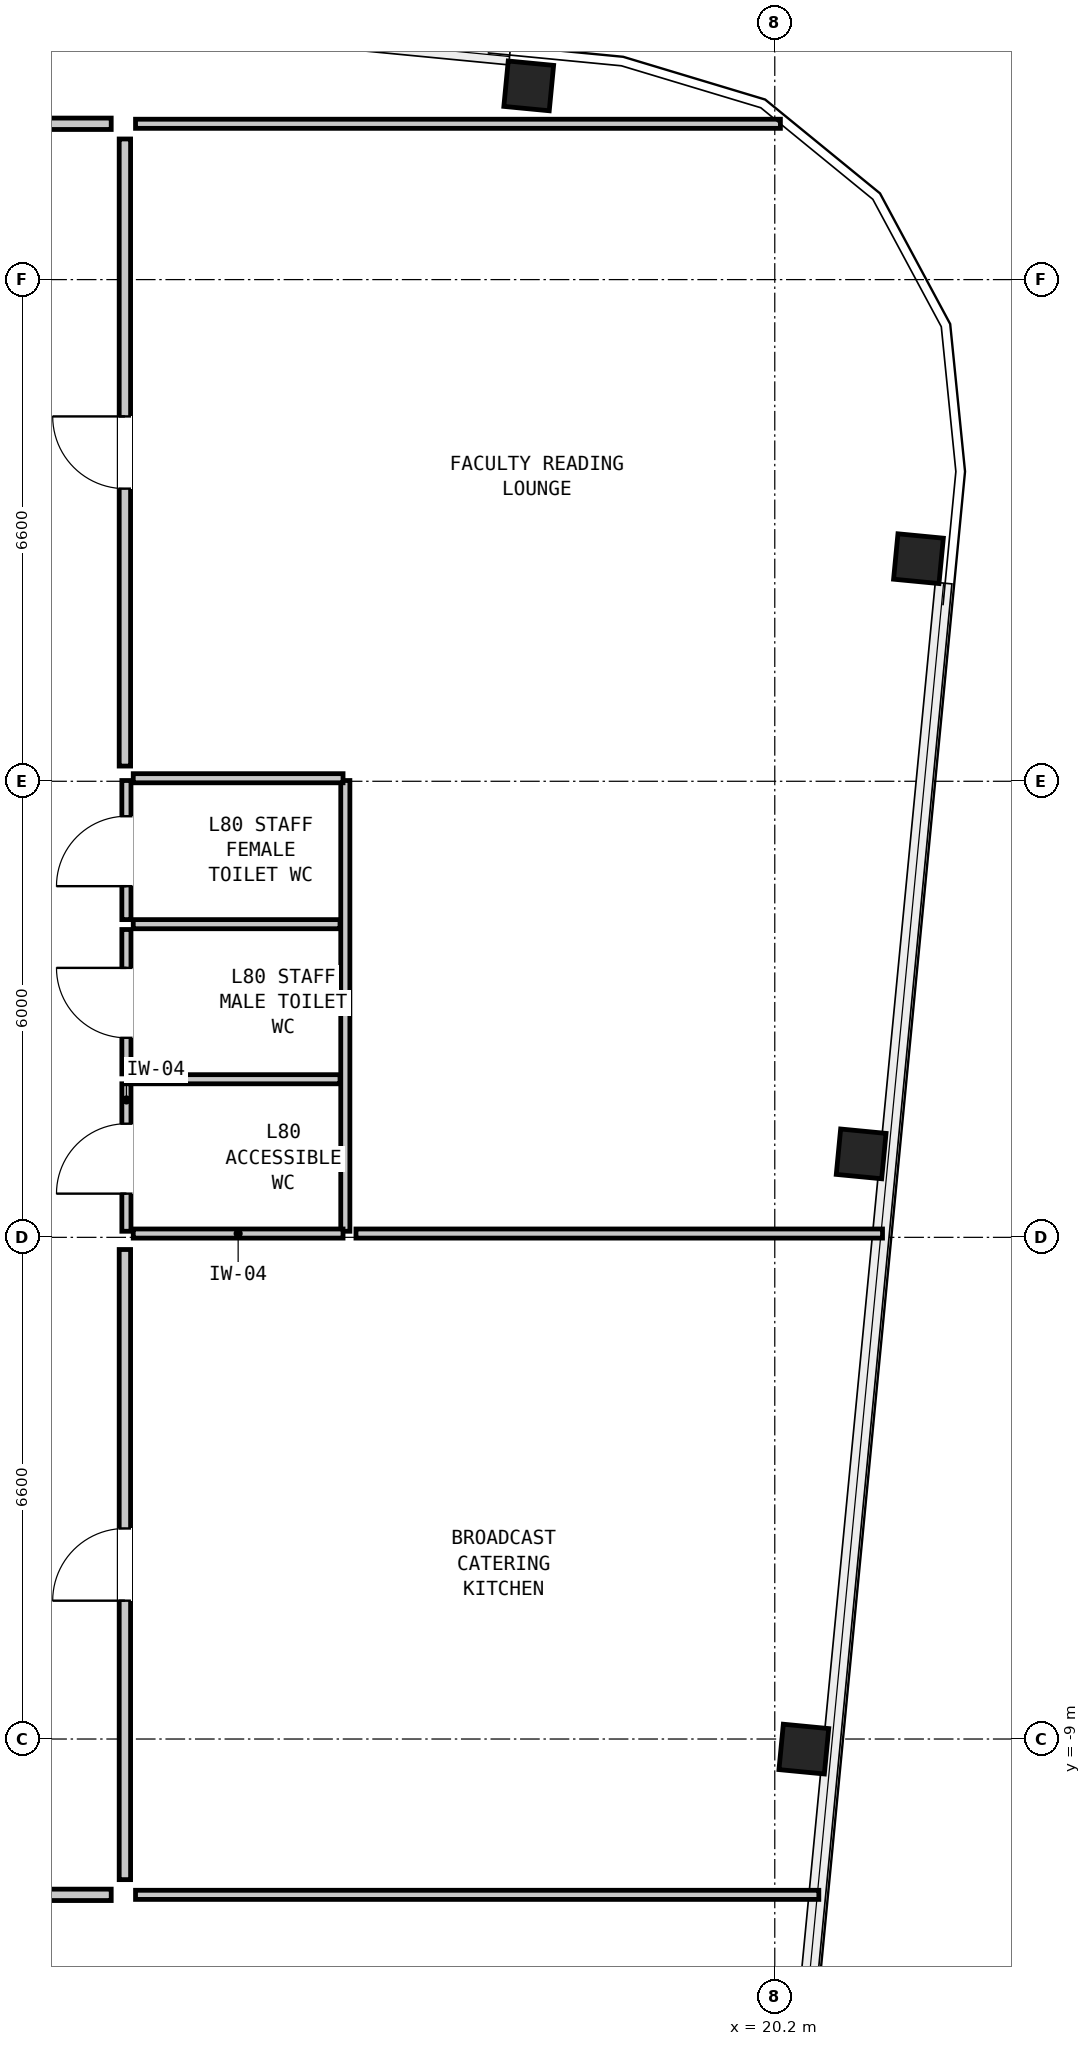
"""IFC4 building model, lengths in metres.
Left out: names, types, materials, properties, quantities, classifications, styles, units other than length and angle.
Written with IfcOpenShell. Run it as: python <this file> out.ifc"""

import sys

from ifc_helpers import new_model, si_unit, direction, frame, frame_2d, origin, origin_2d, place, context, subcontext, project, spatial, rectangle, hollow_rectangle, extrude, element, fill, save


model = new_model("IFC4")
c1 = context("Model", 3, precision=1e-05, world=origin(), true_north=direction((0.0, 1.0)))
c2 = subcontext(c1, "Body", "Model", "MODEL_VIEW")
j1 = project(units=[si_unit("LENGTHUNIT", "METRE"), si_unit("PLANEANGLEUNIT", "RADIAN")], contexts=[c1])
p1 = place(None, origin())
s1 = spatial("IfcSite", under=j1, at=p1, CompositionType="ELEMENT")
p2 = place(p1, origin())
s2 = spatial("IfcBuilding", under=s1, at=p2, CompositionType="ELEMENT")
p3 = place(p2, frame((0.0, 0.0, 270.3)))
s3 = spatial("IfcBuildingStorey", under=s2, at=p3, CompositionType="ELEMENT", Elevation=270.3)
for number, where, z_axis, x_axis in (
    (1, (20.583, -9.133, 0.0), (0.0, 0.0, 1.0), (0.096, 0.995, 0.0)),
    (2, (21.336, -1.302, 0.0), (0.0, 0.0, 1.0), (0.096, 0.995, 0.0)),
    (3, (22.09, 6.528, 0.0), (0.0, 0.0, 1.0), (0.096, 0.995, 0.0)),
    (4, (16.963, 12.749, 0.0), (0.0, 0.0, 1.0), (0.995, -0.096, 0.0)),
):
    element("IfcColumn", number, at=place(p3, frame(where, z_axis=z_axis, x_axis=x_axis)), inside=s3, PredefinedType="COLUMN", context=c2, shape_type="SweptSolid", body=[
        extrude(hollow_rectangle(XDim=0.6, YDim=0.6, WallThickness=0.04, at=origin_2d()), origin(), (0.0, 0.0, 1.0), 3.05),
    ])
p4 = place(p3, frame((11.67, -2.32, 0.0), z_axis=(0.0, 0.0, 1.0), x_axis=(0.0, 1.0, 0.0)))
e5 = element("IfcWall", 5, at=p4, inside=s3, PredefinedType="PARTITIONING", context=c2, shape_type="SweptSolid", body=[
    extrude(rectangle(XDim=1.94, YDim=0.12, at=frame_2d((0.97, 0.0))), origin(), (0.0, 0.0, 1.0), 2.86),
])
p5 = place(p4, frame((0.495, 0.0, 0.0)))
e6 = element("IfcOpeningElement", 6, at=p5, cuts=e5, PredefinedType="OPENING", context=c2, shape_type="SweptSolid", body=[
    extrude(rectangle(XDim=0.92, YDim=2.1, at=frame_2d((0.46, 1.05))), frame((0.0, 0.072, 0.0), z_axis=(0.0, -1.0, 0.0), x_axis=(1.0, 0.0, 0.0)), (0.0, 0.0, 1.0), 0.144),
])
p6 = place(p3, frame((11.67, -0.25, 0.0), z_axis=(0.0, 0.0, 1.0), x_axis=(0.0, 1.0, 0.0)))
e7 = element("IfcWall", 7, at=p6, inside=s3, PredefinedType="PARTITIONING", context=c2, shape_type="SweptSolid", body=[
    extrude(rectangle(XDim=1.9, YDim=0.12, at=frame_2d((0.95, 0.0))), origin(), (0.0, 0.0, 1.0), 2.86),
])
p7 = place(p6, frame((0.475, 0.0, 0.0)))
e8 = element("IfcOpeningElement", 8, at=p7, cuts=e7, PredefinedType="OPENING", context=c2, shape_type="SweptSolid", body=[
    extrude(rectangle(XDim=0.92, YDim=2.1, at=frame_2d((0.46, 1.05))), frame((0.0, 0.072, 0.0), z_axis=(0.0, -1.0, 0.0), x_axis=(1.0, 0.0, 0.0)), (0.0, 0.0, 1.0), 0.144),
])
p8 = place(p3, frame((11.67, 1.78, 0.0), z_axis=(0.0, 0.0, 1.0), x_axis=(0.0, 1.0, 0.0)))
e9 = element("IfcWall", 9, at=p8, inside=s3, PredefinedType="PARTITIONING", context=c2, shape_type="SweptSolid", body=[
    extrude(rectangle(XDim=1.83, YDim=0.12, at=frame_2d((0.915, 0.0))), origin(), (0.0, 0.0, 1.0), 2.86),
])
p9 = place(p8, frame((0.44, 0.0, 0.0)))
e10 = element("IfcOpeningElement", 10, at=p9, cuts=e9, PredefinedType="OPENING", context=c2, shape_type="SweptSolid", body=[
    extrude(rectangle(XDim=0.92, YDim=2.1, at=frame_2d((0.46, 1.05))), frame((0.0, 0.072, 0.0), z_axis=(0.0, -1.0, 0.0), x_axis=(1.0, 0.0, 0.0)), (0.0, 0.0, 1.0), 0.144),
])
p10 = place(p3, frame((14.55, -2.32, 0.0), z_axis=(0.0, 0.0, 1.0), x_axis=(0.0, 1.0, 0.0)))
e11 = element("IfcWall", 11, at=p10, inside=s3, PredefinedType="PARTITIONING", context=c2, shape_type="SweptSolid", body=[
    extrude(rectangle(XDim=5.93, YDim=0.12, at=frame_2d((2.965, 0.0))), origin(), (0.0, 0.0, 1.0), 2.86),
])
for number, where, z_axis, x_axis in (
    (12, (11.76, -2.35, 0.0), (0.0, 0.0, 1.0), (1.0, 0.0, 0.0)),
    (13, (11.76, 3.64, 0.0), (0.0, 0.0, 1.0), (1.0, 0.0, 0.0)),
):
    element("IfcWall", number, at=place(p3, frame(where, z_axis=z_axis, x_axis=x_axis)), inside=s3, PredefinedType="PARTITIONING", context=c2, shape_type="SweptSolid", body=[
        extrude(rectangle(XDim=2.76, YDim=0.12, at=frame_2d((1.38, 0.0))), origin(), (0.0, 0.0, 1.0), 1.24),
    ])
for number, where, z_axis, x_axis in (
    (14, (11.76, -0.32, 0.0), (0.0, 0.0, 1.0), (1.0, 0.0, 0.0)),
    (15, (11.76, 1.72, 0.0), (0.0, 0.0, 1.0), (1.0, 0.0, 0.0)),
):
    element("IfcWall", number, at=place(p3, frame(where, z_axis=z_axis, x_axis=x_axis)), inside=s3, PredefinedType="PARTITIONING", context=c2, shape_type="SweptSolid", body=[
        extrude(rectangle(XDim=2.72, YDim=0.12, at=frame_2d((1.36, 0.0))), origin(), (0.0, 0.0, 1.0), 2.86),
    ])
p11 = place(p3, frame((11.79, 12.25, 0.0), z_axis=(0.0, 0.0, 1.0), x_axis=(1.0, 0.0, 0.0)))
e16 = element("IfcWall", 16, at=p11, inside=s3, PredefinedType="PARTITIONING", context=c2, shape_type="SweptSolid", body=[
    extrude(rectangle(XDim=8.484, YDim=0.12, at=frame_2d((4.242, 0.0))), origin(), (0.0, 0.0, 1.0), 2.86),
])
p12 = place(p3, frame((11.79, -11.05, 0.0), z_axis=(0.0, 0.0, 1.0), x_axis=(1.0, 0.0, 0.0)))
e17 = element("IfcWall", 17, at=p12, inside=s3, PredefinedType="PARTITIONING", context=c2, shape_type="SweptSolid", body=[
    extrude(rectangle(XDim=8.99, YDim=0.12, at=frame_2d((4.495, 0.0))), origin(), (0.0, 0.0, 1.0), 2.86),
])
p13 = place(p3, frame((14.69, -2.35, 0.0), z_axis=(0.0, 0.0, 1.0), x_axis=(1.0, 0.0, 0.0)))
e18 = element("IfcWall", 18, at=p13, inside=s3, PredefinedType="PARTITIONING", context=c2, shape_type="SweptSolid", body=[
    extrude(rectangle(XDim=6.927, YDim=0.12, at=frame_2d((3.464, 0.0))), origin(), (0.0, 0.0, 1.0), 1.24),
])
p14 = place(p3, frame((5.58, 12.25, 0.0), z_axis=(0.0, 0.0, 1.0), x_axis=(1.0, 0.0, 0.0)))
e19 = element("IfcWall", 19, at=p14, inside=s3, PredefinedType="PARTITIONING", context=c2, shape_type="SweptSolid", body=[
    extrude(rectangle(XDim=5.89, YDim=0.15, at=frame_2d((2.945, 0.0))), origin(), (0.0, 0.0, 1.0), 2.86),
])
p15 = place(p14, frame((1.045, 0.0, 0.0)))
e20 = element("IfcOpeningElement", 20, at=p15, cuts=e19, PredefinedType="OPENING", context=c2, shape_type="SweptSolid", body=[
    extrude(rectangle(XDim=1.2, YDim=2.1, at=frame_2d((0.6, 1.05))), frame((0.0, 0.087, 0.0), z_axis=(0.0, -1.0, 0.0), x_axis=(1.0, 0.0, 0.0)), (0.0, 0.0, 1.0), 0.174),
])
p16 = place(p3, frame((0.18, -11.05, 0.0), z_axis=(0.0, 0.0, 1.0), x_axis=(1.0, 0.0, 0.0)))
e21 = element("IfcWall", 21, at=p16, inside=s3, PredefinedType="PARTITIONING", context=c2, shape_type="SweptSolid", body=[
    extrude(rectangle(XDim=11.29, YDim=0.15, at=frame_2d((5.645, 0.0))), origin(), (0.0, 0.0, 1.0), 2.86),
])
p17 = place(p16, frame((5.045, 0.0, 0.0)))
e22 = element("IfcOpeningElement", 22, at=p17, cuts=e21, PredefinedType="OPENING", context=c2, shape_type="SweptSolid", body=[
    extrude(rectangle(XDim=1.2, YDim=2.1, at=frame_2d((0.6, 1.05))), frame((0.0, 0.087, 0.0), z_axis=(0.0, -1.0, 0.0), x_axis=(1.0, 0.0, 0.0)), (0.0, 0.0, 1.0), 0.174),
])
p18 = place(p3, frame((11.65, -10.85, 0.0), z_axis=(0.0, 0.0, 1.0), x_axis=(0.0, 1.0, 0.0)))
e23 = element("IfcWall", 23, at=p18, inside=s3, PredefinedType="PARTITIONING", context=c2, shape_type="SweptSolid", body=[
    extrude(rectangle(XDim=8.29, YDim=0.15, at=frame_2d((4.145, 0.0))), origin(), (0.0, 0.0, 1.0), 2.86),
])
p19 = place(p18, frame((3.67, 0.0, 0.0)))
e24 = element("IfcOpeningElement", 24, at=p19, cuts=e23, PredefinedType="OPENING", context=c2, shape_type="SweptSolid", body=[
    extrude(rectangle(XDim=0.95, YDim=2.1, at=frame_2d((0.475, 1.05))), frame((0.0, 0.087, 0.0), z_axis=(0.0, -1.0, 0.0), x_axis=(1.0, 0.0, 0.0)), (0.0, 0.0, 1.0), 0.174),
])
p20 = place(p3, frame((11.65, 3.8, 0.0), z_axis=(0.0, 0.0, 1.0), x_axis=(0.0, 1.0, 0.0)))
e25 = element("IfcWall", 25, at=p20, inside=s3, PredefinedType="PARTITIONING", context=c2, shape_type="SweptSolid", body=[
    extrude(rectangle(XDim=8.25, YDim=0.15, at=frame_2d((4.125, 0.0))), origin(), (0.0, 0.0, 1.0), 2.86),
])
p21 = place(p20, frame((3.65, 0.0, 0.0)))
e26 = element("IfcOpeningElement", 26, at=p21, cuts=e25, PredefinedType="OPENING", context=c2, shape_type="SweptSolid", body=[
    extrude(rectangle(XDim=0.95, YDim=2.1, at=frame_2d((0.475, 1.05))), frame((0.0, 0.087, 0.0), z_axis=(0.0, -1.0, 0.0), x_axis=(1.0, 0.0, 0.0)), (0.0, 0.0, 1.0), 0.174),
])
p22 = place(p5, origin())
e27 = element("IfcDoor", 27, at=p22, inside=s3, OperationType="SINGLE_SWING_LEFT", PredefinedType="DOOR", context=c2, shape_type="SweptSolid", body=[
    extrude(rectangle(XDim=0.92, YDim=2.1, at=frame_2d((0.46, 1.05))), frame((0.0, 0.025, 0.0), z_axis=(0.0, -1.0, 0.0), x_axis=(1.0, 0.0, 0.0)), (0.0, 0.0, 1.0), 0.05),
])
fill(e6, e27)
p23 = place(p7, origin())
e28 = element("IfcDoor", 28, at=p23, inside=s3, OperationType="SINGLE_SWING_RIGHT", PredefinedType="DOOR", context=c2, shape_type="SweptSolid", body=[
    extrude(rectangle(XDim=0.92, YDim=2.1, at=frame_2d((0.46, 1.05))), frame((0.0, 0.025, 0.0), z_axis=(0.0, -1.0, 0.0), x_axis=(1.0, 0.0, 0.0)), (0.0, 0.0, 1.0), 0.05),
])
fill(e8, e28)
p24 = place(p9, origin())
e29 = element("IfcDoor", 29, at=p24, inside=s3, OperationType="SINGLE_SWING_LEFT", PredefinedType="DOOR", context=c2, shape_type="SweptSolid", body=[
    extrude(rectangle(XDim=0.92, YDim=2.1, at=frame_2d((0.46, 1.05))), frame((0.0, 0.025, 0.0), z_axis=(0.0, -1.0, 0.0), x_axis=(1.0, 0.0, 0.0)), (0.0, 0.0, 1.0), 0.05),
])
fill(e10, e29)
p25 = place(p19, origin())
e30 = element("IfcDoor", 30, at=p25, inside=s3, OperationType="SINGLE_SWING_LEFT", PredefinedType="DOOR", context=c2, shape_type="SweptSolid", body=[
    extrude(rectangle(XDim=0.95, YDim=2.1, at=frame_2d((0.475, 1.05))), frame((0.0, 0.025, 0.0), z_axis=(0.0, -1.0, 0.0), x_axis=(1.0, 0.0, 0.0)), (0.0, 0.0, 1.0), 0.05),
])
fill(e24, e30)
p26 = place(p21, origin())
e31 = element("IfcDoor", 31, at=p26, inside=s3, OperationType="SINGLE_SWING_RIGHT", PredefinedType="DOOR", context=c2, shape_type="SweptSolid", body=[
    extrude(rectangle(XDim=0.95, YDim=2.1, at=frame_2d((0.475, 1.05))), frame((0.0, 0.025, 0.0), z_axis=(0.0, -1.0, 0.0), x_axis=(1.0, 0.0, 0.0)), (0.0, 0.0, 1.0), 0.05),
])
fill(e26, e31)
save(model, sys.argv[1])
